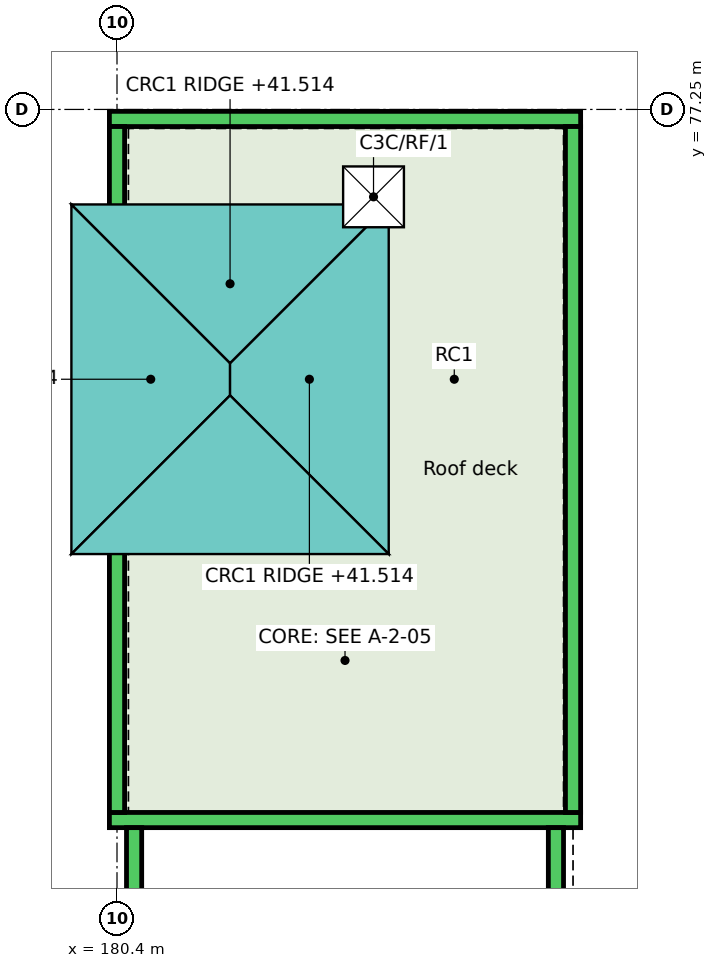
"""IFC4 building model, lengths in metres.
Left out: names, types, materials, properties, quantities, classifications, styles, units other than length and angle.
Written with IfcOpenShell. Run it as: python <this file> out.ifc"""

import sys

from ifc_helpers import new_model, si_unit, direction, frame, frame_2d, origin, origin_2d, place, context, subcontext, project, spatial, rectangle, extrude, element, save


model = new_model("IFC4")
c1 = context("Model", 3, precision=1e-05, world=origin(), true_north=direction((0.0, 1.0)))
c2 = subcontext(c1, "Body", "Model", "MODEL_VIEW")
j1 = project(units=[si_unit("LENGTHUNIT", "METRE"), si_unit("PLANEANGLEUNIT", "RADIAN")], contexts=[c1])
p1 = place(None, origin())
s1 = spatial("IfcSite", under=j1, at=p1, CompositionType="ELEMENT")
p2 = place(p1, origin())
s2 = spatial("IfcBuilding", under=s1, at=p2, CompositionType="ELEMENT")
p3 = place(p2, frame((0.0, 0.0, 39.0)))
s3 = spatial("IfcBuildingStorey", under=s2, at=p3, CompositionType="ELEMENT", Elevation=39.0)
for number, where, z_axis, x_axis in (
    (1, (180.4, 72.1, 0.0), (0.0, 0.0, 1.0), (1.0, 0.0, 0.0)),
    (2, (180.4, 75.3, 0.0), (0.0, 0.0, 1.0), (1.0, 0.0, 0.0)),
):
    element("IfcWall", number, at=place(p3, frame(where, z_axis=z_axis, x_axis=x_axis)), inside=s3, PredefinedType="SHEAR", context=c2, shape_type="SweptSolid", body=[
        extrude(rectangle(XDim=2.975, YDim=0.2, at=frame_2d((1.488, 0.0))), origin(), (0.0, 0.0, 1.0), 1.5),
    ])
p4 = place(p3, frame((183.275, 72.2, 0.0), z_axis=(0.0, 0.0, 1.0), x_axis=(0.0, 1.0, 0.0)))
e3 = element("IfcWall", 3, at=p4, inside=s3, PredefinedType="SHEAR", context=c2, shape_type="SweptSolid", body=[
    extrude(rectangle(XDim=3.0, YDim=0.2, at=frame_2d((1.5, 0.0))), origin(), (0.0, 0.0, 1.0), 1.5),
])
p5 = place(p3, frame((180.475, 72.2, 0.0), z_axis=(0.0, 0.0, 1.0), x_axis=(0.0, 1.0, 0.0)))
e4 = element("IfcWall", 4, at=p5, inside=s3, PredefinedType="SHEAR", context=c2, shape_type="SweptSolid", body=[
    extrude(rectangle(XDim=3.0, YDim=0.15, at=frame_2d((1.5, 0.0))), origin(), (0.0, 0.0, 1.0), 1.5),
])
for number, where, z_axis, x_axis in (
    (5, (180.3, 77.125, 0.0), (0.0, 0.0, 1.0), (1.0, 0.0, 0.0)),
    (6, (180.3, 67.9, 0.0), (0.0, 0.0, 1.0), (1.0, 0.0, 0.0)),
):
    element("IfcWall", number, at=place(p3, frame(where, z_axis=z_axis, x_axis=x_axis)), inside=s3, PredefinedType="PARAPET", context=c2, shape_type="SweptSolid", body=[
        extrude(rectangle(XDim=6.2, YDim=0.2, at=frame_2d((3.1, 0.0))), origin(), (0.0, 0.0, 1.0), 1.1),
    ])
p6 = place(p3, frame((180.4, 68.0, 0.0), z_axis=(0.0, 0.0, 1.0), x_axis=(0.0, 1.0, 0.0)))
e7 = element("IfcWall", 7, at=p6, inside=s3, PredefinedType="PARAPET", context=c2, shape_type="SweptSolid", body=[
    extrude(rectangle(XDim=4.0, YDim=0.2, at=frame_2d((2.0, 0.0))), origin(), (0.0, 0.0, 1.0), 1.1),
])
p7 = place(p3, frame((180.4, 75.4, 0.0), z_axis=(0.0, 0.0, 1.0), x_axis=(0.0, 1.0, 0.0)))
e8 = element("IfcWall", 8, at=p7, inside=s3, PredefinedType="PARAPET", context=c2, shape_type="SweptSolid", body=[
    extrude(rectangle(XDim=1.625, YDim=0.2, at=frame_2d((0.812, 0.0))), origin(), (0.0, 0.0, 1.0), 1.1),
])
p8 = place(p3, frame((186.4, 68.0, 0.0), z_axis=(0.0, 0.0, 1.0), x_axis=(0.0, 1.0, 0.0)))
e9 = element("IfcWall", 9, at=p8, inside=s3, PredefinedType="PARAPET", context=c2, shape_type="SweptSolid", body=[
    extrude(rectangle(XDim=9.025, YDim=0.2, at=frame_2d((4.512, 0.0))), origin(), (0.0, 0.0, 1.0), 1.1),
])
for number, where, z_axis, x_axis in (
    (10, (180.625, 66.225, 0.0), (0.0, 0.0, 1.0), (0.0, 1.0, 0.0)),
    (11, (186.175, 66.225, 0.0), (0.0, 0.0, 1.0), (0.0, 1.0, 0.0)),
):
    element("IfcWall", number, at=place(p3, frame(where, z_axis=z_axis, x_axis=x_axis)), inside=s3, PredefinedType="PARAPET", context=c2, shape_type="SweptSolid", body=[
        extrude(rectangle(XDim=1.575, YDim=0.2, at=frame_2d((0.788, 0.0))), origin(), (0.0, 0.0, 1.0), 1.1),
    ])
p9 = place(p3, frame((0.0, 0.0, -0.25)))
p10 = place(p9, frame((183.775, 76.1, 0.0)))
p11 = place(p10, frame((0.0, 0.0, 0.2)))
e12 = element("IfcDoor", 12, at=p11, inside=s3, OperationType="SINGLE_SWING_LEFT", PredefinedType="TRAPDOOR", context=c2, shape_type="SweptSolid", body=[
    extrude(rectangle(XDim=0.8, YDim=0.8, at=origin_2d()), origin(), (0.0, 0.0, 1.0), 0.05),
])
save(model, sys.argv[1])
